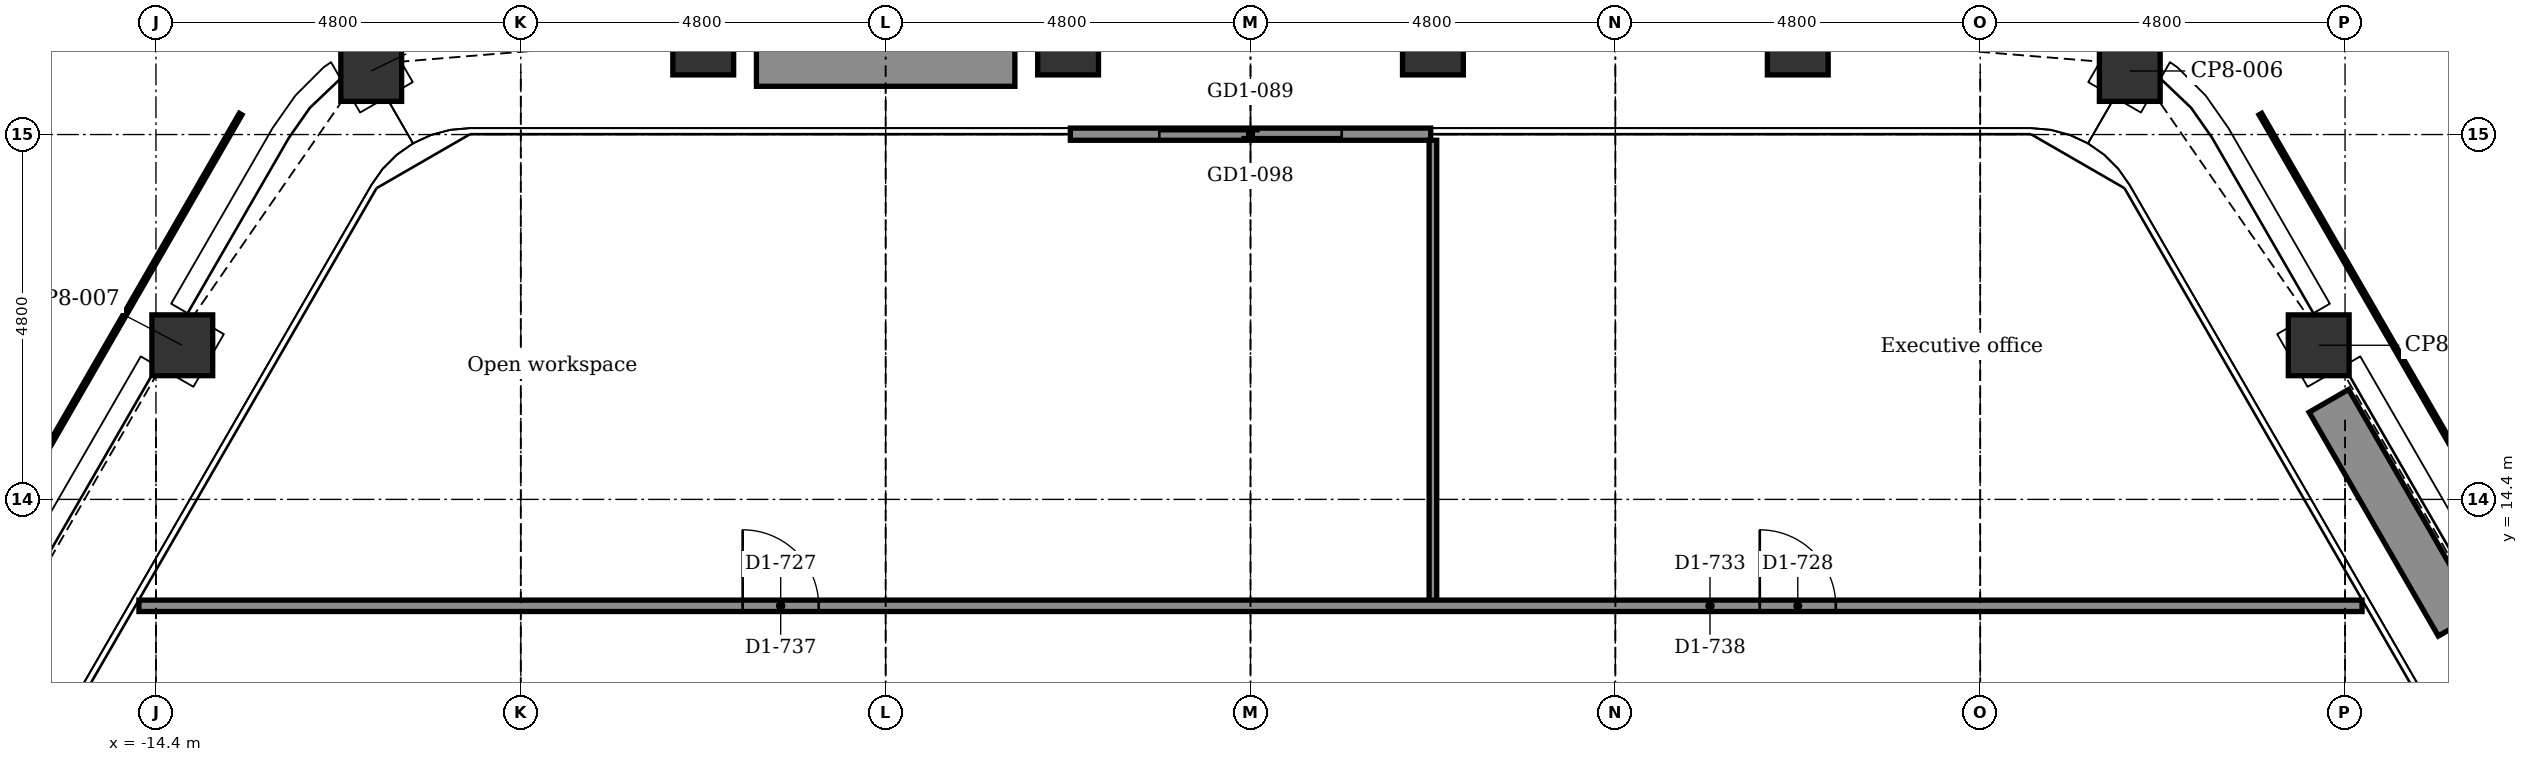
"""IFC4 building model, lengths in metres.
Left out: names, types, materials, properties, quantities, classifications, styles, units other than length and angle.
Written with IfcOpenShell. Run it as: python <this file> out.ifc"""

import sys

from ifc_helpers import new_model, si_unit, direction, frame, frame_2d, origin, origin_2d, place, context, subcontext, project, spatial, rectangle, extrude, element, fill, save


model = new_model("IFC4")
c1 = context("Model", 3, precision=1e-05, world=origin(), true_north=direction((0.0, 1.0)))
c2 = subcontext(c1, "Body", "Model", "MODEL_VIEW")
j1 = project(units=[si_unit("LENGTHUNIT", "METRE"), si_unit("PLANEANGLEUNIT", "RADIAN")], contexts=[c1])
p1 = place(None, origin())
s1 = spatial("IfcSite", under=j1, at=p1, CompositionType="ELEMENT")
p2 = place(p1, origin())
s2 = spatial("IfcBuilding", under=s1, at=p2, CompositionType="ELEMENT")
p3 = place(p2, frame((0.0, 0.0, 273.5)))
s3 = spatial("IfcBuildingStorey", under=s2, at=p3, CompositionType="ELEMENT", Elevation=273.5)
for number, where, z_axis, x_axis in (
    (1, (-11.568, 20.036, -0.15), (0.0, 0.0, 1.0), (0.866, 0.5, 0.0)),
    (2, (-7.2, 20.385, -0.15), (0.0, 0.0, 1.0), (1.0, 0.0, 0.0)),
    (3, (-2.4, 20.385, -0.15), (0.0, 0.0, 1.0), (1.0, 0.0, 0.0)),
    (4, (2.4, 20.385, -0.15), (0.0, 0.0, 1.0), (1.0, 0.0, 0.0)),
    (5, (7.2, 20.385, -0.15), (0.0, 0.0, 1.0), (1.0, 0.0, 0.0)),
    (6, (11.568, 20.036, -0.15), (0.0, 0.0, 1.0), (0.5, 0.866, 0.0)),
    (7, (14.054, 16.428, -0.15), (0.0, 0.0, 1.0), (0.866, 0.5, 0.0)),
    (8, (-14.054, 16.428, -0.15), (0.0, 0.0, 1.0), (0.5, 0.866, 0.0)),
):
    element("IfcColumn", number, at=place(p3, frame(where, z_axis=z_axis, x_axis=x_axis)), inside=s3, PredefinedType="COLUMN", context=c2, shape_type="SweptSolid", body=[
        extrude(rectangle(XDim=0.8, YDim=0.8, at=origin_2d()), origin(), (0.0, 0.0, 1.0), 3.9),
    ])
p4 = place(p3, frame((-2.37, 19.205, 0.0), z_axis=(0.0, 0.0, 1.0), x_axis=(1.0, 0.0, 0.0)))
e9 = element("IfcWall", 9, at=p4, inside=s3, PredefinedType="PARTITIONING", context=c2, shape_type="SweptSolid", body=[
    extrude(rectangle(XDim=4.74, YDim=0.16, at=frame_2d((2.37, 0.0))), origin(), (0.0, 0.0, 1.0), 3.75),
])
p5 = place(p4, frame((1.17, 0.0, 0.0)))
e10 = element("IfcOpeningElement", 10, at=p5, cuts=e9, PredefinedType="OPENING", context=c2, shape_type="SweptSolid", body=[
    extrude(rectangle(XDim=2.4, YDim=2.4, at=frame_2d((1.2, 1.2))), frame((0.0, 0.09, 0.0), z_axis=(0.0, -1.0, 0.0), x_axis=(1.0, 0.0, 0.0)), (0.0, 0.0, 1.0), 0.18),
])
p6 = place(p3, frame((-6.5, 20.135, 0.0), z_axis=(0.0, 0.0, 1.0), x_axis=(1.0, 0.0, 0.0)))
e11 = element("IfcWall", 11, at=p6, inside=s3, PredefinedType="USERDEFINED", context=c2, shape_type="SweptSolid", body=[
    extrude(rectangle(XDim=3.4, YDim=0.6, at=frame_2d((1.7, 0.0))), origin(), (0.0, 0.0, 1.0), 0.7),
])
p7 = place(p3, frame((14.187, 15.697, 0.0), z_axis=(0.0, 0.0, 1.0), x_axis=(0.499977295307, -0.866038511948, 0.0)))
e12 = element("IfcWall", 12, at=p7, inside=s3, PredefinedType="USERDEFINED", context=c2, shape_type="SweptSolid", body=[
    extrude(rectangle(XDim=3.4, YDim=0.6, at=frame_2d((1.7, 0.0))), origin(), (0.0, 0.0, 1.0), 0.7),
])
p8 = place(p3, frame((2.4, 13.0, 0.0), z_axis=(0.0, 0.0, 1.0), x_axis=(0.0, 1.0, 0.0)))
e13 = element("IfcWall", 13, at=p8, inside=s3, PredefinedType="PARTITIONING", context=c2, shape_type="SweptSolid", body=[
    extrude(rectangle(XDim=6.125, YDim=0.1, at=frame_2d((3.062, 0.0))), origin(), (0.0, 0.0, 1.0), 3.75),
])
p9 = place(p3, frame((-14.624, 13.0, 0.0), z_axis=(0.0, 0.0, 1.0), x_axis=(1.0, 0.0, 0.0)))
e14 = element("IfcWall", 14, at=p9, inside=s3, PredefinedType="PARTITIONING", context=c2, shape_type="SweptSolid", body=[
    extrude(rectangle(XDim=29.248, YDim=0.15, at=frame_2d((14.624, 0.0))), origin(), (0.0, 0.0, 1.0), 3.75),
])
p10 = place(p9, frame((7.943, 0.0, 0.0)))
e15 = element("IfcOpeningElement", 15, at=p10, cuts=e14, PredefinedType="OPENING", context=c2, shape_type="SweptSolid", body=[
    extrude(rectangle(XDim=1.0, YDim=2.1, at=frame_2d((0.5, 1.05))), frame((0.0, 0.085, 0.0), z_axis=(0.0, -1.0, 0.0), x_axis=(1.0, 0.0, 0.0)), (0.0, 0.0, 1.0), 0.17),
])
p11 = place(p9, frame((21.324, 0.0, 0.0)))
e16 = element("IfcOpeningElement", 16, at=p11, cuts=e14, PredefinedType="OPENING", context=c2, shape_type="SweptSolid", body=[
    extrude(rectangle(XDim=1.0, YDim=2.1, at=frame_2d((0.5, 1.05))), frame((0.0, 0.085, 0.0), z_axis=(0.0, -1.0, 0.0), x_axis=(1.0, 0.0, 0.0)), (0.0, 0.0, 1.0), 0.17),
])
p12 = place(p5, origin())
e17 = element("IfcDoor", 17, at=p12, inside=s3, OperationType="DOUBLE_DOOR_SLIDING", PredefinedType="DOOR", context=c2, shape_type="SweptSolid", body=[
    extrude(rectangle(XDim=2.4, YDim=2.4, at=frame_2d((1.2, 1.2))), frame((0.0, 0.025, 0.0), z_axis=(0.0, -1.0, 0.0), x_axis=(1.0, 0.0, 0.0)), (0.0, 0.0, 1.0), 0.05),
])
fill(e10, e17)
p13 = place(p10, origin())
e18 = element("IfcDoor", 18, at=p13, inside=s3, OperationType="SINGLE_SWING_LEFT", PredefinedType="DOOR", context=c2, shape_type="SweptSolid", body=[
    extrude(rectangle(XDim=1.0, YDim=2.1, at=frame_2d((0.5, 1.05))), frame((0.0, 0.025, 0.0), z_axis=(0.0, -1.0, 0.0), x_axis=(1.0, 0.0, 0.0)), (0.0, 0.0, 1.0), 0.05),
])
fill(e15, e18)
p14 = place(p11, origin())
e19 = element("IfcDoor", 19, at=p14, inside=s3, OperationType="SINGLE_SWING_LEFT", PredefinedType="DOOR", context=c2, shape_type="SweptSolid", body=[
    extrude(rectangle(XDim=1.0, YDim=2.1, at=frame_2d((0.5, 1.05))), frame((0.0, 0.025, 0.0), z_axis=(0.0, -1.0, 0.0), x_axis=(1.0, 0.0, 0.0)), (0.0, 0.0, 1.0), 0.05),
])
fill(e16, e19)
save(model, sys.argv[1])
